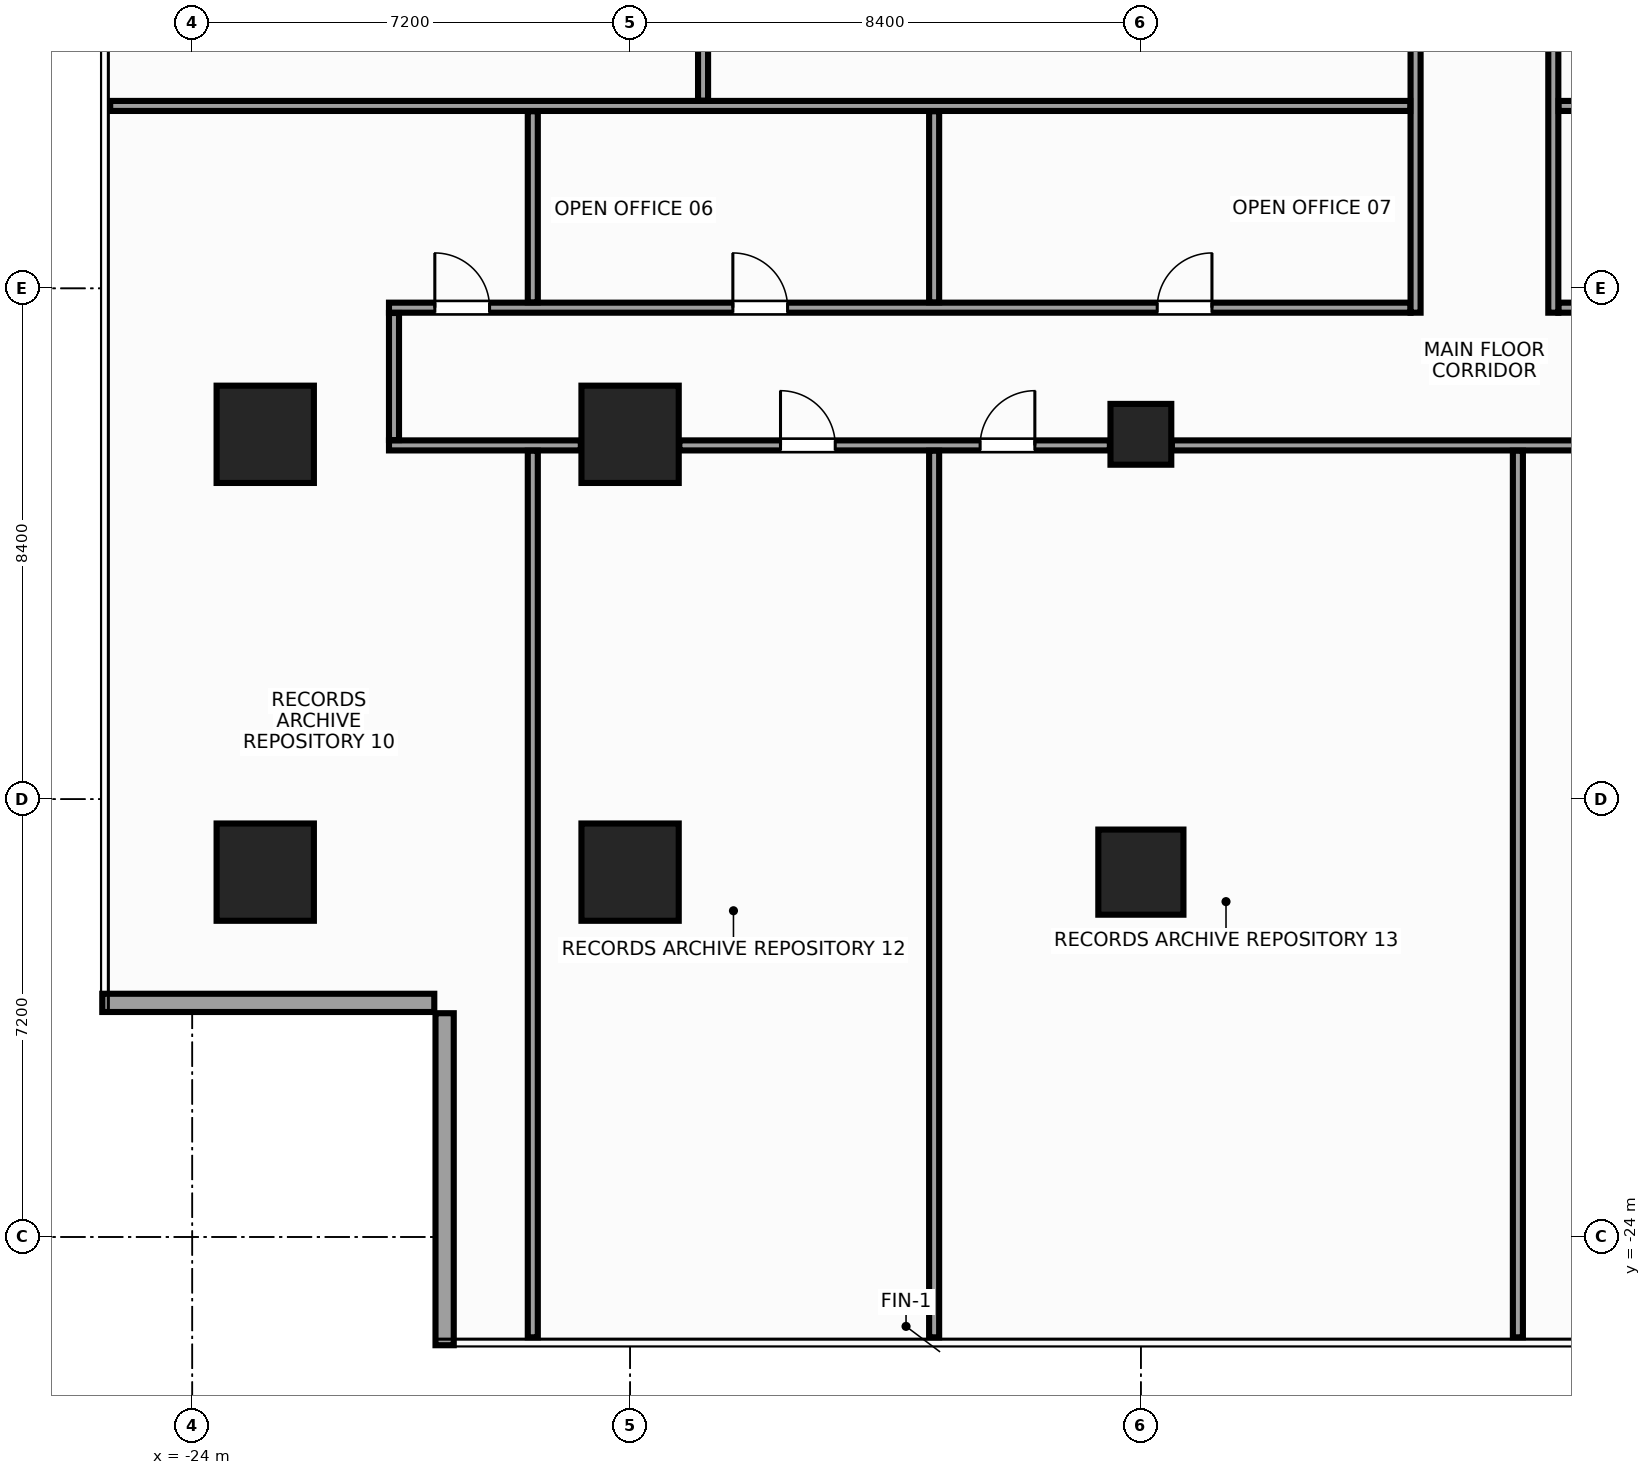
"""IFC4 building model, lengths in metres.
Left out: names, types, materials, properties, quantities, classifications, styles, units other than length and angle.
Written with IfcOpenShell. Run it as: python <this file> out.ifc"""

import sys

from ifc_helpers import new_model, si_unit, direction, frame, frame_2d, origin, origin_2d, place, context, subcontext, project, spatial, rectangle, hollow_rectangle, extrude, source, transform, mapped, element, fill, save


model = new_model("IFC4")
c1 = context("Model", 3, precision=1e-05, world=origin(), true_north=direction((0.0, 1.0)))
c2 = subcontext(c1, "Body", "Model", "MODEL_VIEW")
j1 = project(units=[si_unit("LENGTHUNIT", "METRE"), si_unit("PLANEANGLEUNIT", "RADIAN")], contexts=[c1])
p1 = place(None, origin())
s1 = spatial("IfcSite", under=j1, at=p1, CompositionType="ELEMENT")
p2 = place(p1, origin())
s2 = spatial("IfcBuilding", under=s1, at=p2, CompositionType="ELEMENT")
p3 = place(p2, frame((0.0, 0.0, 106.4)))
s3 = spatial("IfcBuildingStorey", under=s2, at=p3, CompositionType="ELEMENT", Elevation=106.4)
m1 = source(origin(), c2, "Body", "SweptSolid", [
    extrude(rectangle(XDim=1.6, YDim=1.6, at=origin_2d()), origin(), (0.0, 0.0, 1.0), 3.6),
])
for number, where, z_axis, x_axis in (
    (1, (-16.8, -18.0, 0.0), (0.0, 0.0, 1.0), (1.0, 0.0, 0.0)),
    (2, (-16.8, -10.8, 0.0), (0.0, 0.0, 1.0), (1.0, 0.0, 0.0)),
    (3, (-22.8, -18.0, 0.0), (0.0, 0.0, 1.0), (1.0, 0.0, 0.0)),
    (4, (-22.8, -10.8, 0.0), (0.0, 0.0, 1.0), (1.0, 0.0, 0.0)),
):
    element("IfcColumn", number, at=place(p3, frame(where, z_axis=z_axis, x_axis=x_axis)), inside=s3, PredefinedType="COLUMN", context=c2, shape_type="MappedRepresentation", body=[
        mapped(m1, transform((0.0, 0.0, 0.0), x_axis=(1.0, 0.0, 0.0), y_axis=(0.0, 1.0, 0.0), z_axis=(0.0, 0.0, 1.0), scale=1.0)),
    ])
m2 = source(origin(), c2, "Body", "SweptSolid", [
    extrude(rectangle(XDim=1.4, YDim=1.4, at=origin_2d()), origin(), (0.0, 0.0, 1.0), 3.6),
])
p4 = place(p3, frame((-8.4, -18.0, 0.0), z_axis=(0.0, 0.0, 1.0), x_axis=(1.0, 0.0, 0.0)))
e5 = element("IfcColumn", 5, at=p4, inside=s3, PredefinedType="COLUMN", context=c2, shape_type="MappedRepresentation", body=[
    mapped(m2, transform((0.0, 0.0, 0.0), x_axis=(1.0, 0.0, 0.0), y_axis=(0.0, 1.0, 0.0), z_axis=(0.0, 0.0, 1.0), scale=1.0)),
])
m3 = source(origin(), c2, "Body", "SweptSolid", [
    extrude(hollow_rectangle(XDim=1.0, YDim=1.0, WallThickness=0.045, at=origin_2d()), origin(), (0.0, 0.0, 1.0), 3.6),
])
p5 = place(p3, frame((-8.4, -10.8, 0.0), z_axis=(0.0, 0.0, 1.0), x_axis=(1.0, 0.0, 0.0)))
e6 = element("IfcColumn", 6, at=p5, inside=s3, PredefinedType="COLUMN", context=c2, shape_type="MappedRepresentation", body=[
    mapped(m3, transform((0.0, 0.0, 0.0), x_axis=(1.0, 0.0, 0.0), y_axis=(0.0, 1.0, 0.0), z_axis=(0.0, 0.0, 1.0), scale=1.0)),
])
m4 = source(origin(), c2, "Body", "SweptSolid", [
    extrude(rectangle(XDim=5.46, YDim=0.3, at=frame_2d((2.73, 0.0))), origin(), (0.0, 0.0, 1.0), 2.74),
])
for number, where, z_axis, x_axis in (
    (7, (-25.48, -20.15, 0.0), (0.0, 0.0, 1.0), (1.0, 0.0, 0.0)),
    (8, (-19.85, -20.32, 0.0), (0.0, 0.0, 1.0), (0.0, -1.0, 0.0)),
):
    element("IfcWall", number, at=place(p3, frame(where, z_axis=z_axis, x_axis=x_axis)), inside=s3, PredefinedType="STANDARD", context=c2, shape_type="MappedRepresentation", body=[
        mapped(m4, transform((0.0, 0.0, 0.0), x_axis=(1.0, 0.0, 0.0), y_axis=(0.0, 1.0, 0.0), z_axis=(0.0, 0.0, 1.0), scale=1.0)),
    ])
m5 = source(origin(), c2, "Body", "SweptSolid", [
    extrude(rectangle(XDim=16.8, YDim=0.165, at=frame_2d((8.4, 0.0))), origin(), (0.0, 0.0, 1.0), 2.745),
])
p6 = place(p3, frame((-20.765, -8.718, 0.0), z_axis=(0.0, 0.0, 1.0), x_axis=(1.0, 0.0, 0.0)))
e9 = element("IfcWall", 9, at=p6, inside=s3, PredefinedType="PARTITIONING", context=c2, shape_type="MappedRepresentation", body=[
    mapped(m5, transform((0.0, 0.0, 0.0), x_axis=(1.0, 0.0, 0.0), y_axis=(0.0, 1.0, 0.0), z_axis=(0.0, 0.0, 1.0), scale=1.0)),
])
p7 = place(p6, frame((5.655, 0.0, 0.0)))
e10 = element("IfcOpeningElement", 10, at=p7, cuts=e9, PredefinedType="OPENING", context=c2, shape_type="SweptSolid", body=[
    extrude(rectangle(XDim=0.9, YDim=2.15, at=frame_2d((0.45, 1.075))), frame((0.0, 0.094, 0.0), z_axis=(0.0, -1.0, 0.0), x_axis=(1.0, 0.0, 0.0)), (0.0, 0.0, 1.0), 0.189),
])
p8 = place(p6, frame((12.634, 0.0, 0.0)))
e11 = element("IfcOpeningElement", 11, at=p8, cuts=e9, PredefinedType="OPENING", context=c2, shape_type="SweptSolid", body=[
    extrude(rectangle(XDim=0.9, YDim=2.15, at=frame_2d((0.45, 1.075))), frame((0.0, 0.094, 0.0), z_axis=(0.0, -1.0, 0.0), x_axis=(1.0, 0.0, 0.0)), (0.0, 0.0, 1.0), 0.189),
])
p9 = place(p6, frame((0.754, 0.0, 0.0)))
e12 = element("IfcOpeningElement", 12, at=p9, cuts=e9, PredefinedType="OPENING", context=c2, shape_type="SweptSolid", body=[
    extrude(rectangle(XDim=0.9, YDim=2.15, at=frame_2d((0.45, 1.075))), frame((0.0, 0.094, 0.0), z_axis=(0.0, -1.0, 0.0), x_axis=(1.0, 0.0, 0.0)), (0.0, 0.0, 1.0), 0.189),
])
m6 = source(origin(), c2, "Body", "SweptSolid", [
    extrude(rectangle(XDim=22.3, YDim=0.165, at=frame_2d((11.15, 0.0))), origin(), (0.0, 0.0, 1.0), 2.745),
])
p10 = place(p3, frame((-1.535, -8.718, 0.0), z_axis=(0.0, 0.0, 1.0), x_axis=(1.0, 0.0, 0.0)))
e13 = element("IfcWall", 13, at=p10, inside=s3, PredefinedType="PARTITIONING", context=c2, shape_type="MappedRepresentation", body=[
    mapped(m6, transform((0.0, 0.0, 0.0), x_axis=(1.0, 0.0, 0.0), y_axis=(0.0, 1.0, 0.0), z_axis=(0.0, 0.0, 1.0), scale=1.0)),
])
p11 = place(p10, frame((4.036, 0.0, 0.0)))
e14 = element("IfcOpeningElement", 14, at=p11, cuts=e13, PredefinedType="OPENING", context=c2, shape_type="SweptSolid", body=[
    extrude(rectangle(XDim=0.9, YDim=2.15, at=frame_2d((0.45, 1.075))), frame((0.0, 0.094, 0.0), z_axis=(0.0, -1.0, 0.0), x_axis=(1.0, 0.0, 0.0)), (0.0, 0.0, 1.0), 0.189),
])
p12 = place(p10, frame((13.185, 0.0, 0.0)))
e15 = element("IfcOpeningElement", 15, at=p12, cuts=e13, PredefinedType="OPENING", context=c2, shape_type="SweptSolid", body=[
    extrude(rectangle(XDim=0.9, YDim=2.15, at=frame_2d((0.45, 1.075))), frame((0.0, 0.094, 0.0), z_axis=(0.0, -1.0, 0.0), x_axis=(1.0, 0.0, 0.0)), (0.0, 0.0, 1.0), 0.189),
])
p13 = place(p10, frame((19.846, 0.0, 0.0)))
e16 = element("IfcOpeningElement", 16, at=p13, cuts=e13, PredefinedType="OPENING", context=c2, shape_type="SweptSolid", body=[
    extrude(rectangle(XDim=0.9, YDim=2.15, at=frame_2d((0.45, 1.075))), frame((0.0, 0.094, 0.0), z_axis=(0.0, -1.0, 0.0), x_axis=(1.0, 0.0, 0.0)), (0.0, 0.0, 1.0), 0.189),
])
m7 = source(origin(), c2, "Body", "SweptSolid", [
    extrude(rectangle(XDim=3.155, YDim=0.165, at=frame_2d((1.577, 0.0))), origin(), (0.0, 0.0, 1.0), 2.745),
])
p14 = place(p3, frame((-20.765, -10.982, 0.0), z_axis=(0.0, 0.0, 1.0), x_axis=(1.0, 0.0, 0.0)))
e17 = element("IfcWall", 17, at=p14, inside=s3, PredefinedType="PARTITIONING", context=c2, shape_type="MappedRepresentation", body=[
    mapped(m7, transform((0.0, 0.0, 0.0), x_axis=(1.0, 0.0, 0.0), y_axis=(0.0, 1.0, 0.0), z_axis=(0.0, 0.0, 1.0), scale=1.0)),
])
m8 = source(origin(), c2, "Body", "SweptSolid", [
    extrude(rectangle(XDim=7.08, YDim=0.165, at=frame_2d((3.54, 0.0))), origin(), (0.0, 0.0, 1.0), 2.745),
])
p15 = place(p3, frame((-15.99, -10.982, 0.0), z_axis=(0.0, 0.0, 1.0), x_axis=(1.0, 0.0, 0.0)))
e18 = element("IfcWall", 18, at=p15, inside=s3, PredefinedType="PARTITIONING", context=c2, shape_type="MappedRepresentation", body=[
    mapped(m8, transform((0.0, 0.0, 0.0), x_axis=(1.0, 0.0, 0.0), y_axis=(0.0, 1.0, 0.0), z_axis=(0.0, 0.0, 1.0), scale=1.0)),
])
p16 = place(p15, frame((1.664, 0.0, 0.0)))
e19 = element("IfcOpeningElement", 19, at=p16, cuts=e18, PredefinedType="OPENING", context=c2, shape_type="SweptSolid", body=[
    extrude(rectangle(XDim=0.9, YDim=2.15, at=frame_2d((0.45, 1.075))), frame((0.0, 0.094, 0.0), z_axis=(0.0, -1.0, 0.0), x_axis=(1.0, 0.0, 0.0)), (0.0, 0.0, 1.0), 0.189),
])
p17 = place(p15, frame((4.946, 0.0, 0.0)))
e20 = element("IfcOpeningElement", 20, at=p17, cuts=e18, PredefinedType="OPENING", context=c2, shape_type="SweptSolid", body=[
    extrude(rectangle(XDim=0.9, YDim=2.15, at=frame_2d((0.45, 1.075))), frame((0.0, 0.094, 0.0), z_axis=(0.0, -1.0, 0.0), x_axis=(1.0, 0.0, 0.0)), (0.0, 0.0, 1.0), 0.189),
])
m9 = source(origin(), c2, "Body", "SweptSolid", [
    extrude(rectangle(XDim=7.38, YDim=0.165, at=frame_2d((3.69, 0.0))), origin(), (0.0, 0.0, 1.0), 2.745),
])
p18 = place(p3, frame((-7.89, -10.982, 0.0), z_axis=(0.0, 0.0, 1.0), x_axis=(1.0, 0.0, 0.0)))
e21 = element("IfcWall", 21, at=p18, inside=s3, PredefinedType="PARTITIONING", context=c2, shape_type="MappedRepresentation", body=[
    mapped(m9, transform((0.0, 0.0, 0.0), x_axis=(1.0, 0.0, 0.0), y_axis=(0.0, 1.0, 0.0), z_axis=(0.0, 0.0, 1.0), scale=1.0)),
])
m10 = source(origin(), c2, "Body", "SweptSolid", [
    extrude(rectangle(XDim=16.6, YDim=0.165, at=frame_2d((8.3, 0.0))), origin(), (0.0, 0.0, 1.0), 2.645),
])
for number, where, z_axis, x_axis in (
    (22, (-3.883, -8.8, 0.0), (0.0, 0.0, 1.0), (0.0, 1.0, 0.0)),
    (23, (-1.617, -8.8, 0.0), (0.0, 0.0, 1.0), (0.0, 1.0, 0.0)),
):
    element("IfcWall", number, at=place(p3, frame(where, z_axis=z_axis, x_axis=x_axis)), inside=s3, PredefinedType="PARTITIONING", context=c2, shape_type="MappedRepresentation", body=[
        mapped(m10, transform((0.0, 0.0, 0.0), x_axis=(1.0, 0.0, 0.0), y_axis=(0.0, 1.0, 0.0), z_axis=(0.0, 0.0, 1.0), scale=1.0)),
    ])
m11 = source(origin(), c2, "Body", "SweptSolid", [
    extrude(rectangle(XDim=2.09, YDim=0.165, at=frame_2d((1.045, 0.0))), origin(), (0.0, 0.0, 1.0), 3.36),
])
p19 = place(p3, frame((-20.683, -10.895, 0.0), z_axis=(0.0, 0.0, 1.0), x_axis=(0.0, 1.0, 0.0)))
e24 = element("IfcWall", 24, at=p19, inside=s3, PredefinedType="PARTITIONING", context=c2, shape_type="MappedRepresentation", body=[
    mapped(m11, transform((0.0, 0.0, 0.0), x_axis=(1.0, 0.0, 0.0), y_axis=(0.0, 1.0, 0.0), z_axis=(0.0, 0.0, 1.0), scale=1.0)),
])
m12 = source(origin(), c2, "Body", "SweptSolid", [
    extrude(rectangle(XDim=21.38, YDim=0.165, at=frame_2d((10.69, 0.0))), origin(), (0.0, 0.0, 1.0), 2.745),
])
p20 = place(p3, frame((-25.35, -5.4, 0.0), z_axis=(0.0, 0.0, 1.0), x_axis=(1.0, 0.0, 0.0)))
e25 = element("IfcWall", 25, at=p20, inside=s3, PredefinedType="PARTITIONING", context=c2, shape_type="MappedRepresentation", body=[
    mapped(m12, transform((0.0, 0.0, 0.0), x_axis=(1.0, 0.0, 0.0), y_axis=(0.0, 1.0, 0.0), z_axis=(0.0, 0.0, 1.0), scale=1.0)),
])
m13 = source(origin(), c2, "Body", "SweptSolid", [
    extrude(rectangle(XDim=26.88, YDim=0.165, at=frame_2d((13.44, 0.0))), origin(), (0.0, 0.0, 1.0), 2.745),
])
p21 = place(p3, frame((-1.53, -5.4, 0.0), z_axis=(0.0, 0.0, 1.0), x_axis=(1.0, 0.0, 0.0)))
e26 = element("IfcWall", 26, at=p21, inside=s3, PredefinedType="PARTITIONING", context=c2, shape_type="MappedRepresentation", body=[
    mapped(m13, transform((0.0, 0.0, 0.0), x_axis=(1.0, 0.0, 0.0), y_axis=(0.0, 1.0, 0.0), z_axis=(0.0, 0.0, 1.0), scale=1.0)),
])
m14 = source(origin(), c2, "Body", "SweptSolid", [
    extrude(rectangle(XDim=12.942, YDim=0.165, at=frame_2d((6.471, 0.0))), origin(), (0.0, 0.0, 1.0), 2.645),
])
p22 = place(p3, frame((-15.6, -5.312, 0.0), z_axis=(0.0, 0.0, 1.0), x_axis=(0.0, 1.0, 0.0)))
e27 = element("IfcWall", 27, at=p22, inside=s3, PredefinedType="PARTITIONING", context=c2, shape_type="MappedRepresentation", body=[
    mapped(m14, transform((0.0, 0.0, 0.0), x_axis=(1.0, 0.0, 0.0), y_axis=(0.0, 1.0, 0.0), z_axis=(0.0, 0.0, 1.0), scale=1.0)),
])
m15 = source(origin(), c2, "Body", "SweptSolid", [
    extrude(rectangle(XDim=14.58, YDim=0.165, at=frame_2d((7.29, 0.0))), origin(), (0.0, 0.0, 1.0), 2.745),
])
p23 = place(p3, frame((-18.4, -25.65, 0.0), z_axis=(0.0, 0.0, 1.0), x_axis=(0.0, 1.0, 0.0)))
e28 = element("IfcWall", 28, at=p23, inside=s3, PredefinedType="PARTITIONING", context=c2, shape_type="MappedRepresentation", body=[
    mapped(m15, transform((0.0, 0.0, 0.0), x_axis=(1.0, 0.0, 0.0), y_axis=(0.0, 1.0, 0.0), z_axis=(0.0, 0.0, 1.0), scale=1.0)),
])
m16 = source(origin(), c2, "Body", "SweptSolid", [
    extrude(rectangle(XDim=3.142, YDim=0.165, at=frame_2d((1.571, 0.0))), origin(), (0.0, 0.0, 1.0), 3.36),
])
p24 = place(p3, frame((-18.4, -8.63, 0.0), z_axis=(0.0, 0.0, 1.0), x_axis=(0.0, 1.0, 0.0)))
e29 = element("IfcWall", 29, at=p24, inside=s3, PredefinedType="PARTITIONING", context=c2, shape_type="MappedRepresentation", body=[
    mapped(m16, transform((0.0, 0.0, 0.0), x_axis=(1.0, 0.0, 0.0), y_axis=(0.0, 1.0, 0.0), z_axis=(0.0, 0.0, 1.0), scale=1.0)),
])
p25 = place(p3, frame((-11.8, -25.65, 0.0), z_axis=(0.0, 0.0, 1.0), x_axis=(0.0, 1.0, 0.0)))
e30 = element("IfcWall", 30, at=p25, inside=s3, PredefinedType="PARTITIONING", context=c2, shape_type="MappedRepresentation", body=[
    mapped(m15, transform((0.0, 0.0, 0.0), x_axis=(1.0, 0.0, 0.0), y_axis=(0.0, 1.0, 0.0), z_axis=(0.0, 0.0, 1.0), scale=1.0)),
])
p26 = place(p3, frame((-11.8, -8.63, 0.0), z_axis=(0.0, 0.0, 1.0), x_axis=(0.0, 1.0, 0.0)))
e31 = element("IfcWall", 31, at=p26, inside=s3, PredefinedType="PARTITIONING", context=c2, shape_type="MappedRepresentation", body=[
    mapped(m16, transform((0.0, 0.0, 0.0), x_axis=(1.0, 0.0, 0.0), y_axis=(0.0, 1.0, 0.0), z_axis=(0.0, 0.0, 1.0), scale=1.0)),
])
p27 = place(p3, frame((-2.2, -25.65, 0.0), z_axis=(0.0, 0.0, 1.0), x_axis=(0.0, 1.0, 0.0)))
e32 = element("IfcWall", 32, at=p27, inside=s3, PredefinedType="PARTITIONING", context=c2, shape_type="MappedRepresentation", body=[
    mapped(m15, transform((0.0, 0.0, 0.0), x_axis=(1.0, 0.0, 0.0), y_axis=(0.0, 1.0, 0.0), z_axis=(0.0, 0.0, 1.0), scale=1.0)),
])
m17 = source(origin(), c2, "Body", "SweptSolid", [
    extrude(rectangle(XDim=0.9, YDim=2.15, at=frame_2d((0.45, 1.075))), frame((0.0, 0.025, 0.0), z_axis=(0.0, -1.0, 0.0), x_axis=(1.0, 0.0, 0.0)), (0.0, 0.0, 1.0), 0.05),
])
p28 = place(p7, origin())
e33 = element("IfcDoor", 33, at=p28, inside=s3, OperationType="SINGLE_SWING_LEFT", PredefinedType="DOOR", context=c2, shape_type="MappedRepresentation", body=[
    mapped(m17, transform((0.0, 0.0, 0.0), x_axis=(1.0, 0.0, 0.0), y_axis=(0.0, 1.0, 0.0), z_axis=(0.0, 0.0, 1.0), scale=1.0)),
])
fill(e10, e33)
p29 = place(p8, origin())
e34 = element("IfcDoor", 34, at=p29, inside=s3, OperationType="SINGLE_SWING_RIGHT", PredefinedType="DOOR", context=c2, shape_type="MappedRepresentation", body=[
    mapped(m17, transform((0.0, 0.0, 0.0), x_axis=(1.0, 0.0, 0.0), y_axis=(0.0, 1.0, 0.0), z_axis=(0.0, 0.0, 1.0), scale=1.0)),
])
fill(e11, e34)
p30 = place(p9, origin())
e35 = element("IfcDoor", 35, at=p30, inside=s3, OperationType="SINGLE_SWING_LEFT", PredefinedType="DOOR", context=c2, shape_type="MappedRepresentation", body=[
    mapped(m17, transform((0.0, 0.0, 0.0), x_axis=(1.0, 0.0, 0.0), y_axis=(0.0, 1.0, 0.0), z_axis=(0.0, 0.0, 1.0), scale=1.0)),
])
fill(e12, e35)
p31 = place(p16, origin())
e36 = element("IfcDoor", 36, at=p31, inside=s3, OperationType="SINGLE_SWING_LEFT", PredefinedType="DOOR", context=c2, shape_type="MappedRepresentation", body=[
    mapped(m17, transform((0.0, 0.0, 0.0), x_axis=(1.0, 0.0, 0.0), y_axis=(0.0, 1.0, 0.0), z_axis=(0.0, 0.0, 1.0), scale=1.0)),
])
fill(e19, e36)
p32 = place(p17, origin())
e37 = element("IfcDoor", 37, at=p32, inside=s3, OperationType="SINGLE_SWING_RIGHT", PredefinedType="DOOR", context=c2, shape_type="MappedRepresentation", body=[
    mapped(m17, transform((0.0, 0.0, 0.0), x_axis=(1.0, 0.0, 0.0), y_axis=(0.0, 1.0, 0.0), z_axis=(0.0, 0.0, 1.0), scale=1.0)),
])
fill(e20, e37)
save(model, sys.argv[1])
